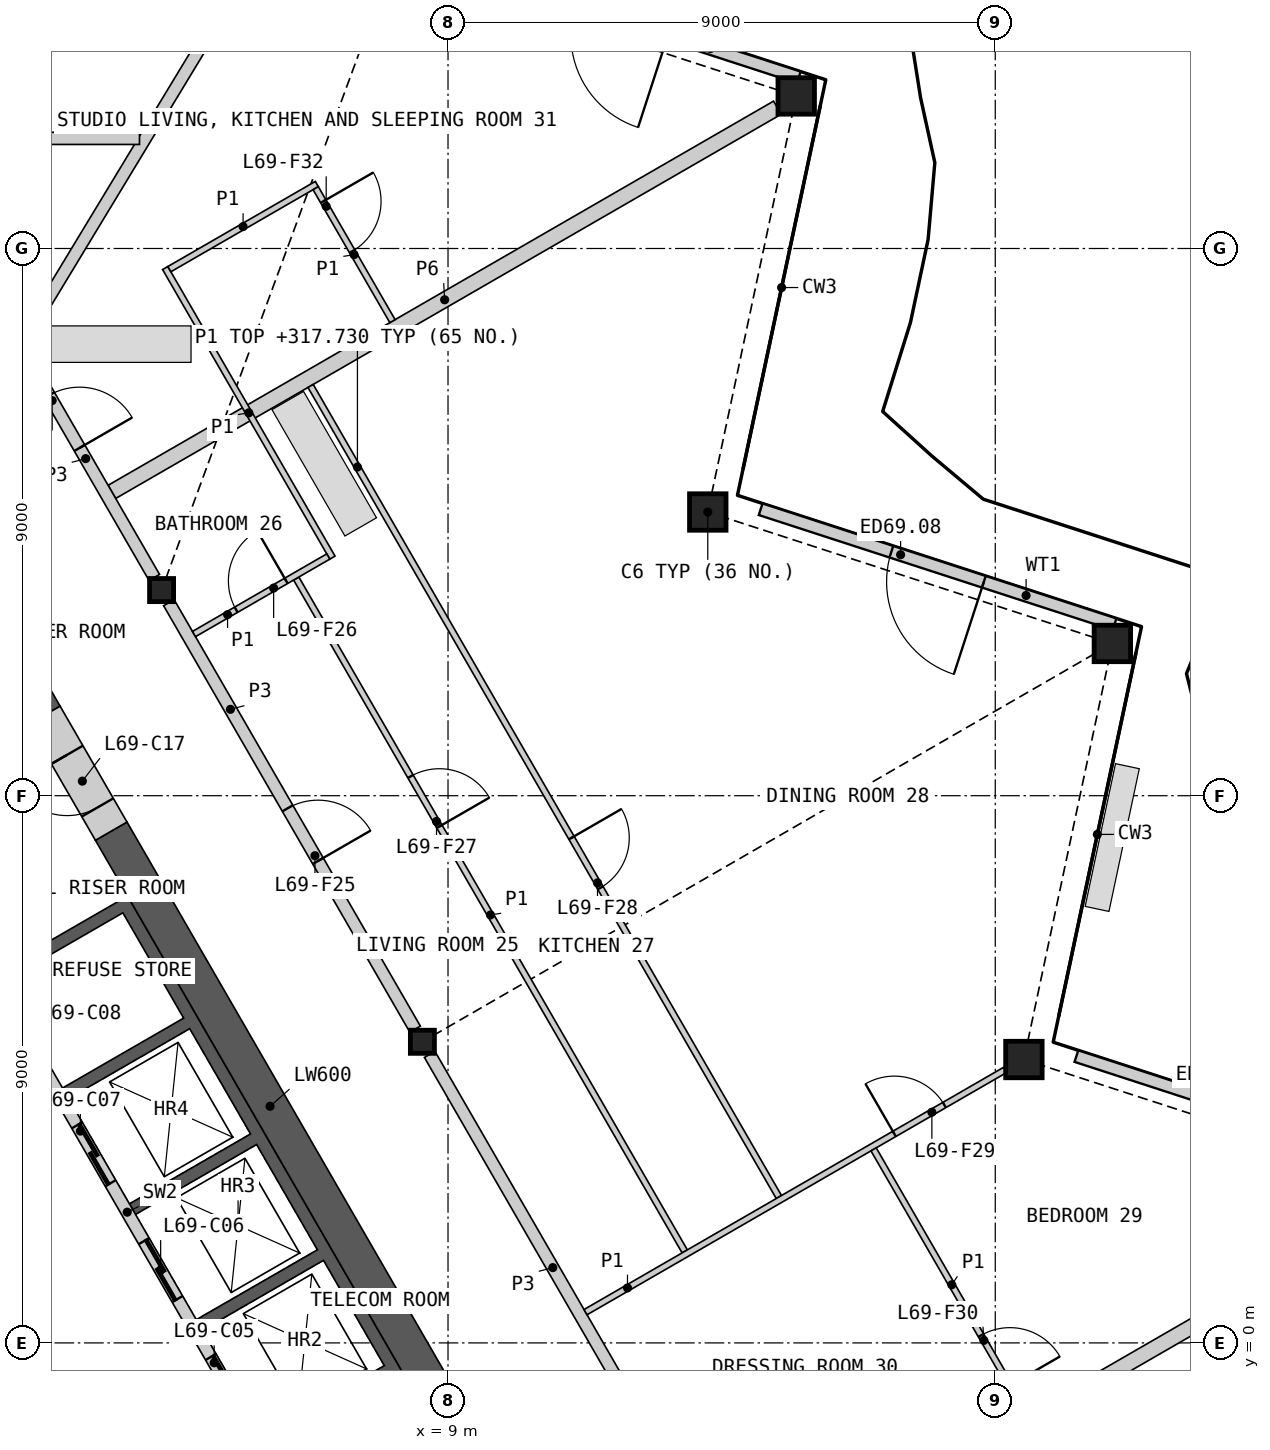
"""IFC4 building model, lengths in metres.
Left out: names, types, materials, properties, quantities, classifications, styles, units other than length and angle.
Written with IfcOpenShell. Run it as: python <this file> out.ifc"""

import sys

from ifc_helpers import new_model, si_unit, direction, frame, frame_2d, origin, origin_2d, place, context, subcontext, project, spatial, polyline, rectangle, hollow_rectangle, i_section, outline, extrude, element, fill, save


model = new_model("IFC4")
c1 = context("Model", 3, precision=1e-05, world=origin(), true_north=direction((0.0, 1.0)))
c2 = subcontext(c1, "Body", "Model", "MODEL_VIEW")
j1 = project(units=[si_unit("LENGTHUNIT", "METRE"), si_unit("PLANEANGLEUNIT", "RADIAN")], contexts=[c1])
p1 = place(None, origin())
s1 = spatial("IfcSite", under=j1, at=p1, CompositionType="ELEMENT")
p2 = place(p1, origin())
s2 = spatial("IfcBuilding", under=s1, at=p2, CompositionType="ELEMENT")
p3 = place(p2, frame((0.0, 0.0, 315.4)))
s3 = spatial("IfcBuildingStorey", under=s2, at=p3, CompositionType="ELEMENT", Elevation=315.4)
for number, where, z_axis, x_axis in (
    (1, (18.471, 4.661, 0.0), (0.0, 0.0, 1.0), (1.0, 0.0, 0.0)),
    (2, (19.926, 11.504, 0.0), (0.0, 0.0, 1.0), (1.0, 0.0, 0.0)),
    (3, (13.272, 13.666, 0.0), (0.0, 0.0, 1.0), (1.0, 0.0, 0.0)),
    (4, (14.727, 20.509, 0.0), (0.0, 0.0, 1.0), (1.0, 0.0, 0.0)),
):
    element("IfcColumn", number, at=place(p3, frame(where, z_axis=z_axis, x_axis=x_axis)), inside=s3, PredefinedType="COLUMN", context=c2, shape_type="SweptSolid", body=[
        extrude(hollow_rectangle(XDim=0.6, YDim=0.6, WallThickness=0.04, at=origin_2d()), origin(), (0.0, 0.0, 1.0), 3.4),
    ])
for number, where, z_axis, x_axis in (
    (5, (8.578, 4.953, 0.0), (0.0, 0.0, 1.0), (1.0, 0.0, 0.0)),
    (6, (4.289, 12.382, 0.0), (0.0, 0.0, 1.0), (1.0, 0.0, 0.0)),
):
    element("IfcColumn", number, at=place(p3, frame(where, z_axis=z_axis, x_axis=x_axis)), inside=s3, PredefinedType="COLUMN", context=c2, shape_type="SweptSolid", body=[
        extrude(i_section(OverallWidth=0.396, OverallDepth=0.381, WebThickness=0.019, FlangeThickness=0.03, at=origin_2d()), origin(), (0.0, 0.0, 1.0), 3.4),
    ])
p4 = place(p3, frame((25.155, 2.826, 0.0), z_axis=(0.0, 0.0, 1.0), x_axis=(-0.951053709789, 0.309025631781, 0.0)))
e7 = element("IfcWall", 7, at=p4, inside=s3, PredefinedType="SOLIDWALL", context=c2, shape_type="SweptSolid", body=[
    extrude(rectangle(XDim=6.12, YDim=0.2, at=frame_2d((3.06, 0.0))), origin(), (0.0, 0.0, 1.0), 2.488),
])
p5 = place(p4, frame((2.26, 0.0, 0.0)))
e8 = element("IfcOpeningElement", 8, at=p5, cuts=e7, PredefinedType="OPENING", context=c2, shape_type="SweptSolid", body=[
    extrude(rectangle(XDim=1.6, YDim=2.25, at=frame_2d((0.8, 1.125))), frame((0.0, 0.11, 0.0), z_axis=(0.0, -1.0, 0.0), x_axis=(1.0, 0.0, 0.0)), (0.0, 0.0, 1.0), 0.22),
])
p6 = place(p3, frame((19.962, 11.82, 0.0), z_axis=(0.0, 0.0, 1.0), x_axis=(-0.951053709789, 0.309025631781, 0.0)))
e9 = element("IfcWall", 9, at=p6, inside=s3, PredefinedType="SOLIDWALL", context=c2, shape_type="SweptSolid", body=[
    extrude(rectangle(XDim=6.12, YDim=0.2, at=frame_2d((3.06, 0.0))), origin(), (0.0, 0.0, 1.0), 2.488),
])
p7 = place(p6, frame((2.26, 0.0, 0.0)))
e10 = element("IfcOpeningElement", 10, at=p7, cuts=e9, PredefinedType="OPENING", context=c2, shape_type="SweptSolid", body=[
    extrude(rectangle(XDim=1.6, YDim=2.25, at=frame_2d((0.8, 1.125))), frame((0.0, 0.11, 0.0), z_axis=(0.0, -1.0, 0.0), x_axis=(1.0, 0.0, 0.0)), (0.0, 0.0, 1.0), 0.22),
])
p8 = place(p3, frame((14.769, 20.814, 0.0), z_axis=(0.0, 0.0, 1.0), x_axis=(-0.951069243123, 0.308977822483, 0.0)))
e11 = element("IfcWall", 11, at=p8, inside=s3, PredefinedType="SOLIDWALL", context=c2, shape_type="SweptSolid", body=[
    extrude(rectangle(XDim=6.12, YDim=0.2, at=frame_2d((3.06, 0.0))), origin(), (0.0, 0.0, 1.0), 2.488),
])
p9 = place(p8, frame((2.26, 0.0, 0.0)))
e12 = element("IfcOpeningElement", 12, at=p9, cuts=e11, PredefinedType="OPENING", context=c2, shape_type="SweptSolid", body=[
    extrude(rectangle(XDim=1.6, YDim=2.25, at=frame_2d((0.8, 1.125))), frame((0.0, 0.11, 0.0), z_axis=(0.0, -1.0, 0.0), x_axis=(1.0, 0.0, 0.0)), (0.0, 0.0, 1.0), 0.22),
])
p10 = place(p3, origin())
e13 = element("IfcWall", 13, at=p10, inside=s3, PredefinedType="SHEAR", context=c2, shape_type="SweptSolid", body=[
    extrude(outline(polyline([(1.561, 6.097), (3.731, 7.35), (8.231, -0.444), (6.061, -1.697), (5.96, -1.524), (7.952, -0.374), (6.952, 1.358), (4.96, 0.208), (4.861, 0.381), (6.852, 1.531), (5.852, 3.263), (3.861, 2.113), (3.76, 2.287), (5.752, 3.437), (4.752, 5.169), (2.76, 4.019), (2.66, 4.192), (4.652, 5.342), (3.652, 7.074), (1.66, 5.924), (1.561, 6.097)])), origin(), (0.0, 0.0, 1.0), 3.1),
])
p11 = place(p3, frame((5.817, -1.476, 0.0), z_axis=(0.0, 0.0, 1.0), x_axis=(-0.500002616675, 0.866023893041, 0.0)))
e14 = element("IfcWall", 14, at=p11, inside=s3, PredefinedType="SOLIDWALL", context=c2, shape_type="SweptSolid", body=[
    extrude(rectangle(XDim=8.373, YDim=0.2, at=frame_2d((4.187, 0.0))), origin(), (0.0, 0.0, 1.0), 3.1),
])
p12 = place(p11, frame((0.337, 0.0, 0.0)))
e15 = element("IfcOpeningElement", 15, at=p12, cuts=e14, PredefinedType="OPENING", context=c2, shape_type="SweptSolid", body=[
    extrude(rectangle(XDim=1.1, YDim=2.1, at=frame_2d((0.55, 1.05))), frame((0.0, 0.11, 0.0), z_axis=(0.0, -1.0, 0.0), x_axis=(1.0, 0.0, 0.0)), (0.0, 0.0, 1.0), 0.22),
])
p13 = place(p11, frame((2.537, 0.0, 0.0)))
e16 = element("IfcOpeningElement", 16, at=p13, cuts=e14, PredefinedType="OPENING", context=c2, shape_type="SweptSolid", body=[
    extrude(rectangle(XDim=1.1, YDim=2.1, at=frame_2d((0.55, 1.05))), frame((0.0, 0.11, 0.0), z_axis=(0.0, -1.0, 0.0), x_axis=(1.0, 0.0, 0.0)), (0.0, 0.0, 1.0), 0.22),
])
p14 = place(p11, frame((4.737, 0.0, 0.0)))
e17 = element("IfcOpeningElement", 17, at=p14, cuts=e14, PredefinedType="OPENING", context=c2, shape_type="SweptSolid", body=[
    extrude(rectangle(XDim=1.1, YDim=2.1, at=frame_2d((0.55, 1.05))), frame((0.0, 0.11, 0.0), z_axis=(0.0, -1.0, 0.0), x_axis=(1.0, 0.0, 0.0)), (0.0, 0.0, 1.0), 0.22),
])
p15 = place(p11, frame((7.037, 0.0, 0.0)))
e18 = element("IfcOpeningElement", 18, at=p15, cuts=e14, PredefinedType="OPENING", context=c2, shape_type="SweptSolid", body=[
    extrude(rectangle(XDim=0.9, YDim=2.1, at=frame_2d((0.45, 1.05))), frame((0.0, 0.11, 0.0), z_axis=(0.0, -1.0, 0.0), x_axis=(1.0, 0.0, 0.0)), (0.0, 0.0, 1.0), 0.22),
])
p16 = place(p3, frame((8.686, -0.634, 0.0), z_axis=(0.0, 0.0, 1.0), x_axis=(-0.50001836461, 0.866014800712, 0.0)))
e19 = element("IfcWall", 19, at=p16, inside=s3, PredefinedType="SHEAR", context=c2, shape_type="SweptSolid", body=[
    extrude(rectangle(XDim=10.451, YDim=0.6, at=frame_2d((5.225, 0.0))), origin(), (0.0, 0.0, 1.0), 3.1),
])
p17 = place(p3, frame((2.361, 10.322, 0.0), z_axis=(0.0, 0.0, 1.0), x_axis=(-0.500000735859, 0.866024978935, 0.0)))
e20 = element("IfcWall", 20, at=p17, inside=s3, PredefinedType="SHEAR", context=c2, shape_type="SweptSolid", body=[
    extrude(rectangle(XDim=4.202, YDim=0.6, at=frame_2d((2.101, 0.0))), origin(), (0.0, 0.0, 1.0), 3.1),
])
p18 = place(p3, frame((3.461, 8.417, 0.0), z_axis=(0.0, 0.0, 1.0), x_axis=(-0.499946605688, 0.86605622881, 0.0)))
e21 = element("IfcWall", 21, at=p18, inside=s3, PredefinedType="SHEAR", context=c2, shape_type="SweptSolid", body=[
    extrude(rectangle(XDim=2.2, YDim=0.6, at=frame_2d((1.1, 0.0))), origin(), (0.0, 0.0, 1.0), 3.1),
])
p19 = place(p18, frame((0.45, 0.0, 0.0)))
e22 = element("IfcOpeningElement", 22, at=p19, cuts=e21, PredefinedType="OPENING", context=c2, shape_type="SweptSolid", body=[
    extrude(rectangle(XDim=1.0, YDim=2.1, at=frame_2d((0.5, 1.05))), frame((0.0, 0.31, 0.0), z_axis=(0.0, -1.0, 0.0), x_axis=(1.0, 0.0, 0.0)), (0.0, 0.0, 1.0), 0.62),
])
p20 = place(p3, frame((3.472, 13.997, 0.0), z_axis=(0.0, 0.0, 1.0), x_axis=(0.866029233976, 0.499993365855, 0.0)))
e23 = element("IfcWall", 23, at=p20, inside=s3, PredefinedType="PARTITIONING", context=c2, shape_type="SweptSolid", body=[
    extrude(rectangle(XDim=12.637, YDim=0.25, at=frame_2d((6.319, 0.0))), origin(), (0.0, 0.0, 1.0), 2.33),
])
p21 = place(p3, frame((8.698, 4.745, 0.0), z_axis=(0.0, 0.0, 1.0), x_axis=(0.499984266882, -0.866034487114, 0.0)))
e24 = element("IfcWall", 24, at=p21, inside=s3, PredefinedType="PARTITIONING", context=c2, shape_type="SweptSolid", body=[
    extrude(rectangle(XDim=8.099, YDim=0.2, at=frame_2d((4.049, 0.0))), origin(), (0.0, 0.0, 1.0), 3.1),
])
p22 = place(p3, frame((4.409, 12.174, 0.0), z_axis=(0.0, 0.0, 1.0), x_axis=(0.499984266882, -0.866034487114, 0.0)))
e25 = element("IfcWall", 25, at=p22, inside=s3, PredefinedType="PARTITIONING", context=c2, shape_type="SweptSolid", body=[
    extrude(rectangle(XDim=8.099, YDim=0.2, at=frame_2d((4.049, 0.0))), origin(), (0.0, 0.0, 1.0), 3.1),
])
p23 = place(p22, frame((3.905, 0.0, 0.0)))
e26 = element("IfcOpeningElement", 26, at=p23, cuts=e25, PredefinedType="OPENING", context=c2, shape_type="SweptSolid", body=[
    extrude(rectangle(XDim=1.0, YDim=2.1, at=frame_2d((0.5, 1.05))), frame((0.0, 0.11, 0.0), z_axis=(0.0, -1.0, 0.0), x_axis=(1.0, 0.0, 0.0)), (0.0, 0.0, 1.0), 0.22),
])
p24 = place(p3, frame((18.454, -1.338, 0.0), z_axis=(0.0, 0.0, 1.0), x_axis=(0.866023407002, 0.500003458512, 0.0)))
e27 = element("IfcWall", 27, at=p24, inside=s3, PredefinedType="PARTITIONING", context=c2, shape_type="SweptSolid", body=[
    extrude(rectangle(XDim=7.345, YDim=0.25, at=frame_2d((3.673, 0.0))), origin(), (0.0, 0.0, 1.0), 2.33),
])
p25 = place(p3, frame((1.913, 16.498, 0.0), z_axis=(0.0, 0.0, 1.0), x_axis=(0.499950370306, -0.866054055606, 0.0)))
e28 = element("IfcWall", 28, at=p25, inside=s3, PredefinedType="PARTITIONING", context=c2, shape_type="SweptSolid", body=[
    extrude(rectangle(XDim=4.513, YDim=0.2, at=frame_2d((2.256, 0.0))), origin(), (0.0, 0.0, 1.0), 3.1),
])
p26 = place(p25, frame((1.053, 0.0, 0.0)))
e29 = element("IfcOpeningElement", 29, at=p26, cuts=e28, PredefinedType="OPENING", context=c2, shape_type="SweptSolid", body=[
    extrude(rectangle(XDim=1.0, YDim=2.1, at=frame_2d((0.5, 1.05))), frame((0.0, 0.11, 0.0), z_axis=(0.0, -1.0, 0.0), x_axis=(1.0, 0.0, 0.0)), (0.0, 0.0, 1.0), 0.22),
])
p27 = place(p3, frame((2.015, 16.497, 0.0), z_axis=(0.0, 0.0, 1.0), x_axis=(0.517779253395, 0.855514257482, 0.0)))
e30 = element("IfcWall", 30, at=p27, inside=s3, PredefinedType="PARTITIONING", context=c2, shape_type="SweptSolid", body=[
    extrude(rectangle(XDim=14.854, YDim=0.2, at=frame_2d((7.427, 0.0))), origin(), (0.0, 0.0, 1.0), 2.33),
])
p28 = place(p3, frame((0.208, 19.811, 0.0), z_axis=(0.0, 0.0, 1.0), x_axis=(1.0, 0.0, 0.0)))
e31 = element("IfcWall", 31, at=p28, inside=s3, PredefinedType="PARTITIONING", context=c2, shape_type="SweptSolid", body=[
    extrude(rectangle(XDim=3.718, YDim=0.2, at=frame_2d((1.859, 0.0))), origin(), (0.0, 0.0, 1.0), 2.33),
])
p29 = place(p3, frame((6.74, 15.739, 0.0), z_axis=(0.0, 0.0, 1.0), x_axis=(0.499995022685, -0.86602827742, 0.0)))
e32 = element("IfcWall", 32, at=p29, inside=s3, PredefinedType="PARTITIONING", context=c2, shape_type="SweptSolid", body=[
    extrude(rectangle(XDim=15.404, YDim=0.1, at=frame_2d((7.702, 0.0))), origin(), (0.0, 0.0, 1.0), 2.33),
])
p30 = place(p29, frame((8.582, 0.0, 0.0)))
e33 = element("IfcOpeningElement", 33, at=p30, cuts=e32, PredefinedType="OPENING", context=c2, shape_type="SweptSolid", body=[
    extrude(rectangle(XDim=0.95, YDim=2.1, at=frame_2d((0.475, 1.05))), frame((0.0, 0.06, 0.0), z_axis=(0.0, -1.0, 0.0), x_axis=(1.0, 0.0, 0.0)), (0.0, 0.0, 1.0), 0.12),
])
p31 = place(p3, frame((6.504, 12.572, 0.0), z_axis=(0.0, 0.0, 1.0), x_axis=(0.499998094172, -0.866026504112, 0.0)))
e34 = element("IfcWall", 34, at=p31, inside=s3, PredefinedType="PARTITIONING", context=c2, shape_type="SweptSolid", body=[
    extrude(rectangle(XDim=12.778, YDim=0.1, at=frame_2d((6.389, 0.0))), origin(), (0.0, 0.0, 1.0), 2.33),
])
p32 = place(p31, frame((3.759, 0.0, 0.0)))
e35 = element("IfcOpeningElement", 35, at=p32, cuts=e34, PredefinedType="OPENING", context=c2, shape_type="SweptSolid", body=[
    extrude(rectangle(XDim=0.95, YDim=2.1, at=frame_2d((0.475, 1.05))), frame((0.0, 0.06, 0.0), z_axis=(0.0, -1.0, 0.0), x_axis=(1.0, 0.0, 0.0)), (0.0, 0.0, 1.0), 0.12),
])
p33 = place(p3, frame((11.261, 0.506, 0.0), z_axis=(0.0, 0.0, 1.0), x_axis=(0.866024323732, 0.500001870701, 0.0)))
e36 = element("IfcWall", 36, at=p33, inside=s3, PredefinedType="PARTITIONING", context=c2, shape_type="SweptSolid", body=[
    extrude(rectangle(XDim=7.967, YDim=0.1, at=frame_2d((3.983, 0.0))), origin(), (0.0, 0.0, 1.0), 2.33),
])
p34 = place(p33, frame((5.865, 0.0, 0.0)))
e37 = element("IfcOpeningElement", 37, at=p34, cuts=e36, PredefinedType="OPENING", context=c2, shape_type="SweptSolid", body=[
    extrude(rectangle(XDim=0.95, YDim=2.1, at=frame_2d((0.475, 1.05))), frame((0.0, 0.06, 0.0), z_axis=(0.0, -1.0, 0.0), x_axis=(1.0, 0.0, 0.0)), (0.0, 0.0, 1.0), 0.12),
])
p35 = place(p3, frame((4.349, 17.679, 0.0), z_axis=(0.0, 0.0, 1.0), x_axis=(0.49997732567, -0.866038494419, 0.0)))
e38 = element("IfcWall", 38, at=p35, inside=s3, PredefinedType="PARTITIONING", context=c2, shape_type="SweptSolid", body=[
    extrude(rectangle(XDim=5.5, YDim=0.1, at=frame_2d((2.75, 0.0))), origin(), (0.0, 0.0, 1.0), 2.33),
])
p36 = place(p3, frame((15.999, 3.183, 0.0), z_axis=(0.0, 0.0, 1.0), x_axis=(0.500014207086, -0.866017201164, 0.0)))
e39 = element("IfcWall", 39, at=p36, inside=s3, PredefinedType="PARTITIONING", context=c2, shape_type="SweptSolid", body=[
    extrude(rectangle(XDim=5.143, YDim=0.1, at=frame_2d((2.571, 0.0))), origin(), (0.0, 0.0, 1.0), 2.33),
])
p37 = place(p36, frame((3.532, 0.0, 0.0)))
e40 = element("IfcOpeningElement", 40, at=p37, cuts=e39, PredefinedType="OPENING", context=c2, shape_type="SweptSolid", body=[
    extrude(rectangle(XDim=0.95, YDim=2.1, at=frame_2d((0.475, 1.05))), frame((0.0, 0.06, 0.0), z_axis=(0.0, -1.0, 0.0), x_axis=(1.0, 0.0, 0.0)), (0.0, 0.0, 1.0), 0.12),
])
p38 = place(p3, frame((4.417, 17.66, 0.0), z_axis=(0.0, 0.0, 1.0), x_axis=(0.866034573852, 0.49998411664, 0.0)))
e41 = element("IfcWall", 41, at=p38, inside=s3, PredefinedType="PARTITIONING", context=c2, shape_type="SweptSolid", body=[
    extrude(rectangle(XDim=2.8, YDim=0.1, at=frame_2d((1.4, 0.0))), origin(), (0.0, 0.0, 1.0), 2.33),
])
p39 = place(p3, frame((6.824, 18.992, 0.0), z_axis=(0.0, 0.0, 1.0), x_axis=(0.50001820224, -0.866014894461, 0.0)))
e42 = element("IfcWall", 42, at=p39, inside=s3, PredefinedType="PARTITIONING", context=c2, shape_type="SweptSolid", body=[
    extrude(rectangle(XDim=2.525, YDim=0.1, at=frame_2d((1.262, 0.0))), origin(), (0.0, 0.0, 1.0), 2.33),
])
p40 = place(p39, frame((0.25, 0.0, 0.0)))
e43 = element("IfcOpeningElement", 43, at=p40, cuts=e42, PredefinedType="OPENING", context=c2, shape_type="SweptSolid", body=[
    extrude(rectangle(XDim=0.95, YDim=2.1, at=frame_2d((0.475, 1.05))), frame((0.0, 0.06, 0.0), z_axis=(0.0, -1.0, 0.0), x_axis=(1.0, 0.0, 0.0)), (0.0, 0.0, 1.0), 0.12),
])
p41 = place(p3, frame((4.822, 11.659, 0.0), z_axis=(0.0, 0.0, 1.0), x_axis=(0.866030925526, 0.499990435942, 0.0)))
e44 = element("IfcWall", 44, at=p41, inside=s3, PredefinedType="PARTITIONING", context=c2, shape_type="SweptSolid", body=[
    extrude(rectangle(XDim=2.55, YDim=0.1, at=frame_2d((1.275, 0.0))), origin(), (0.0, 0.0, 1.0), 2.33),
])
p42 = place(p41, frame((0.8, 0.0, 0.0)))
e45 = element("IfcOpeningElement", 45, at=p42, cuts=e44, PredefinedType="OPENING", context=c2, shape_type="SweptSolid", body=[
    extrude(rectangle(XDim=0.95, YDim=2.1, at=frame_2d((0.475, 1.05))), frame((0.0, 0.06, 0.0), z_axis=(0.0, -1.0, 0.0), x_axis=(1.0, 0.0, 0.0)), (0.0, 0.0, 1.0), 0.12),
])
p43 = place(p7, origin())
e46 = element("IfcDoor", 46, at=p43, inside=s3, OperationType="DOUBLE_DOOR_SINGLE_SWING", PredefinedType="DOOR", context=c2, shape_type="SweptSolid", body=[
    extrude(rectangle(XDim=1.6, YDim=2.25, at=frame_2d((0.8, 1.125))), frame((0.0, 0.025, 0.0), z_axis=(0.0, -1.0, 0.0), x_axis=(1.0, 0.0, 0.0)), (0.0, 0.0, 1.0), 0.05),
])
fill(e10, e46)
p44 = place(p12, origin())
e47 = element("IfcDoor", 47, at=p44, inside=s3, OperationType="SLIDING_TO_LEFT", PredefinedType="DOOR", context=c2, shape_type="SweptSolid", body=[
    extrude(rectangle(XDim=1.1, YDim=2.1, at=frame_2d((0.55, 1.05))), frame((0.0, 0.025, 0.0), z_axis=(0.0, -1.0, 0.0), x_axis=(1.0, 0.0, 0.0)), (0.0, 0.0, 1.0), 0.05),
])
fill(e15, e47)
p45 = place(p13, origin())
e48 = element("IfcDoor", 48, at=p45, inside=s3, OperationType="SLIDING_TO_LEFT", PredefinedType="DOOR", context=c2, shape_type="SweptSolid", body=[
    extrude(rectangle(XDim=1.1, YDim=2.1, at=frame_2d((0.55, 1.05))), frame((0.0, 0.025, 0.0), z_axis=(0.0, -1.0, 0.0), x_axis=(1.0, 0.0, 0.0)), (0.0, 0.0, 1.0), 0.05),
])
fill(e16, e48)
p46 = place(p14, origin())
e49 = element("IfcDoor", 49, at=p46, inside=s3, OperationType="SLIDING_TO_LEFT", PredefinedType="DOOR", context=c2, shape_type="SweptSolid", body=[
    extrude(rectangle(XDim=1.1, YDim=2.1, at=frame_2d((0.55, 1.05))), frame((0.0, 0.025, 0.0), z_axis=(0.0, -1.0, 0.0), x_axis=(1.0, 0.0, 0.0)), (0.0, 0.0, 1.0), 0.05),
])
fill(e17, e49)
p47 = place(p19, origin())
e50 = element("IfcDoor", 50, at=p47, inside=s3, OperationType="SINGLE_SWING_RIGHT", PredefinedType="DOOR", context=c2, shape_type="SweptSolid", body=[
    extrude(rectangle(XDim=1.0, YDim=2.1, at=frame_2d((0.5, 1.05))), frame((0.0, 0.055, 0.0), z_axis=(0.0, -1.0, 0.0), x_axis=(1.0, 0.0, 0.0)), (0.0, 0.0, 1.0), 0.05),
])
fill(e22, e50)
p48 = place(p23, origin())
e51 = element("IfcDoor", 51, at=p48, inside=s3, OperationType="SINGLE_SWING_RIGHT", PredefinedType="DOOR", context=c2, shape_type="SweptSolid", body=[
    extrude(rectangle(XDim=1.0, YDim=2.1, at=frame_2d((0.5, 1.05))), frame((0.0, 0.025, 0.0), z_axis=(0.0, -1.0, 0.0), x_axis=(1.0, 0.0, 0.0)), (0.0, 0.0, 1.0), 0.05),
])
fill(e26, e51)
p49 = place(p42, origin())
e52 = element("IfcDoor", 52, at=p49, inside=s3, OperationType="SINGLE_SWING_RIGHT", PredefinedType="DOOR", context=c2, shape_type="SweptSolid", body=[
    extrude(rectangle(XDim=0.95, YDim=2.1, at=frame_2d((0.475, 1.05))), frame((0.0, 0.025, 0.0), z_axis=(0.0, -1.0, 0.0), x_axis=(1.0, 0.0, 0.0)), (0.0, 0.0, 1.0), 0.05),
])
fill(e45, e52)
p50 = place(p32, origin())
e53 = element("IfcDoor", 53, at=p50, inside=s3, OperationType="SINGLE_SWING_RIGHT", PredefinedType="DOOR", context=c2, shape_type="SweptSolid", body=[
    extrude(rectangle(XDim=0.95, YDim=2.1, at=frame_2d((0.475, 1.05))), frame((0.0, 0.025, 0.0), z_axis=(0.0, -1.0, 0.0), x_axis=(1.0, 0.0, 0.0)), (0.0, 0.0, 1.0), 0.05),
])
fill(e35, e53)
p51 = place(p30, origin())
e54 = element("IfcDoor", 54, at=p51, inside=s3, OperationType="SINGLE_SWING_LEFT", PredefinedType="DOOR", context=c2, shape_type="SweptSolid", body=[
    extrude(rectangle(XDim=0.95, YDim=2.1, at=frame_2d((0.475, 1.05))), frame((0.0, 0.025, 0.0), z_axis=(0.0, -1.0, 0.0), x_axis=(1.0, 0.0, 0.0)), (0.0, 0.0, 1.0), 0.05),
])
fill(e33, e54)
p52 = place(p34, origin())
e55 = element("IfcDoor", 55, at=p52, inside=s3, OperationType="SINGLE_SWING_LEFT", PredefinedType="DOOR", context=c2, shape_type="SweptSolid", body=[
    extrude(rectangle(XDim=0.95, YDim=2.1, at=frame_2d((0.475, 1.05))), frame((0.0, 0.025, 0.0), z_axis=(0.0, -1.0, 0.0), x_axis=(1.0, 0.0, 0.0)), (0.0, 0.0, 1.0), 0.05),
])
fill(e37, e55)
p53 = place(p37, origin())
e56 = element("IfcDoor", 56, at=p53, inside=s3, OperationType="SINGLE_SWING_RIGHT", PredefinedType="DOOR", context=c2, shape_type="SweptSolid", body=[
    extrude(rectangle(XDim=0.95, YDim=2.1, at=frame_2d((0.475, 1.05))), frame((0.0, 0.025, 0.0), z_axis=(0.0, -1.0, 0.0), x_axis=(1.0, 0.0, 0.0)), (0.0, 0.0, 1.0), 0.05),
])
fill(e40, e56)
p54 = place(p26, origin())
e57 = element("IfcDoor", 57, at=p54, inside=s3, OperationType="SINGLE_SWING_RIGHT", PredefinedType="DOOR", context=c2, shape_type="SweptSolid", body=[
    extrude(rectangle(XDim=1.0, YDim=2.1, at=frame_2d((0.5, 1.05))), frame((0.0, 0.025, 0.0), z_axis=(0.0, -1.0, 0.0), x_axis=(1.0, 0.0, 0.0)), (0.0, 0.0, 1.0), 0.05),
])
fill(e29, e57)
p55 = place(p40, origin())
e58 = element("IfcDoor", 58, at=p55, inside=s3, OperationType="SINGLE_SWING_LEFT", PredefinedType="DOOR", context=c2, shape_type="SweptSolid", body=[
    extrude(rectangle(XDim=0.95, YDim=2.1, at=frame_2d((0.475, 1.05))), frame((0.0, 0.025, 0.0), z_axis=(0.0, -1.0, 0.0), x_axis=(1.0, 0.0, 0.0)), (0.0, 0.0, 1.0), 0.05),
])
fill(e43, e58)
save(model, sys.argv[1])
